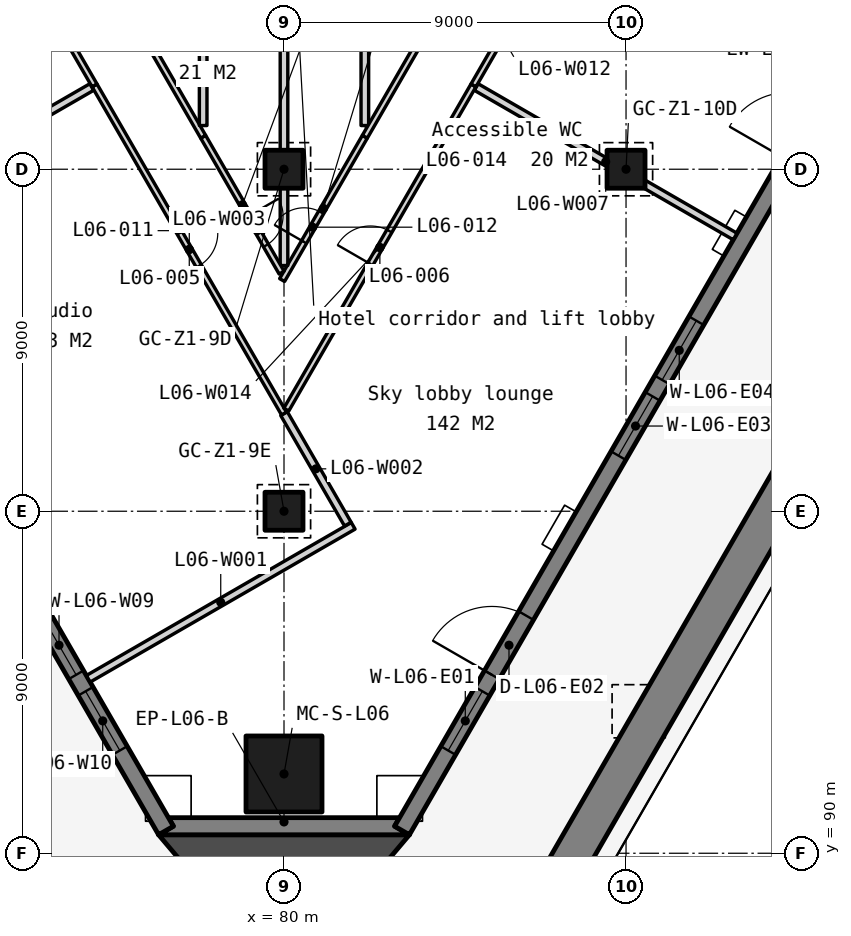
"""IFC4 building model, lengths in metres.
Left out: names, types, materials, properties, quantities, classifications, styles, units other than length and angle.
Written with IfcOpenShell. Run it as: python <this file> out.ifc"""

import sys

from ifc_helpers import new_model, si_unit, direction, frame, frame_2d, origin, origin_2d, place, context, subcontext, project, spatial, polyline, rectangle, outline, extrude, element, fill, save


model = new_model("IFC4")
c1 = context("Model", 3, precision=1e-05, world=origin(), true_north=direction((0.0, 1.0)))
c2 = subcontext(c1, "Body", "Model", "MODEL_VIEW")
j1 = project(units=[si_unit("LENGTHUNIT", "METRE"), si_unit("PLANEANGLEUNIT", "RADIAN")], contexts=[c1])
p1 = place(None, origin())
s1 = spatial("IfcSite", under=j1, at=p1, CompositionType="ELEMENT")
p2 = place(p1, origin())
s2 = spatial("IfcBuilding", under=s1, at=p2, CompositionType="ELEMENT")
p3 = place(p2, frame((0.0, 0.0, 35.0)))
s3 = spatial("IfcBuildingStorey", under=s2, at=p3, CompositionType="ELEMENT", Elevation=35.0)
for number, where, z_axis, x_axis in (
    (1, (80.0, 99.0, 0.0), (0.0, 0.0, 1.0), (1.0, 0.0, 0.0)),
    (2, (80.0, 108.0, 0.0), (0.0, 0.0, 1.0), (1.0, 0.0, 0.0)),
    (3, (89.0, 108.0, 0.0), (0.0, 0.0, 1.0), (1.0, 0.0, 0.0)),
):
    element("IfcColumn", number, at=place(p3, frame(where, z_axis=z_axis, x_axis=x_axis)), inside=s3, PredefinedType="COLUMN", context=c2, shape_type="SweptSolid", body=[
        extrude(rectangle(XDim=1.0, YDim=1.0, at=origin_2d()), origin(), (0.0, 0.0, 1.0), 3.5),
    ])
p4 = place(p3, frame((80.0, 92.086, 0.0), z_axis=(0.0, 0.0, 1.0), x_axis=(1.0, 0.0, 0.0)))
e4 = element("IfcColumn", 4, at=p4, inside=s3, PredefinedType="COLUMN", context=c2, shape_type="SweptSolid", body=[
    extrude(rectangle(XDim=2.0, YDim=2.0, at=origin_2d()), origin(), (0.0, 0.0, 1.0), 3.5),
])
p5 = place(p3, frame((0.0, 0.0, -0.2)))
e5 = element("IfcWall", 5, at=p5, inside=s3, PredefinedType="SOLIDWALL", context=c2, shape_type="SweptSolid", body=[
    extrude(outline(polyline([(76.7, 90.486), (77.09, 90.711), (76.96, 90.936), (83.04, 90.936), (82.91, 90.711), (83.3, 90.486), (76.7, 90.486)])), origin(), (0.0, 0.0, 1.0), 3.55),
])
p6 = place(p3, frame((54.495, 129.397, -0.2), z_axis=(0.0, 0.0, 1.0), x_axis=(0.499999201451, -0.866025864826, 0.0)))
e6 = element("IfcWall", 6, at=p6, inside=s3, PredefinedType="SOLIDWALL", context=c2, shape_type="SweptSolid", body=[
    extrude(outline(polyline([(44.8, 0.0), (44.8, 3.55), (0.0, 3.55), (0.0, 0.0), (44.8, 0.0)])), frame((0.0, 0.225, 0.0), z_axis=(0.0, -1.0, 0.0), x_axis=(1.0, 0.0, 0.0)), (0.0, 0.0, 1.0), 0.45),
])
p7 = place(p6, frame((2.43, 0.0, 1.1)))
e7 = element("IfcOpeningElement", 7, at=p7, cuts=e6, PredefinedType="OPENING", context=c2, shape_type="SweptSolid", body=[
    extrude(rectangle(XDim=1.8, YDim=1.5, at=frame_2d((0.9, 0.75))), frame((0.0, 0.235, 0.0), z_axis=(0.0, -1.0, 0.0), x_axis=(1.0, 0.0, 0.0)), (0.0, 0.0, 1.0), 0.47),
])
p8 = place(p6, frame((4.73, 0.0, 0.2)))
e8 = element("IfcOpeningElement", 8, at=p8, cuts=e6, PredefinedType="OPENING", context=c2, shape_type="SweptSolid", body=[
    extrude(rectangle(XDim=1.8, YDim=2.4, at=frame_2d((0.9, 1.2))), frame((0.0, 0.235, 0.0), z_axis=(0.0, -1.0, 0.0), x_axis=(1.0, 0.0, 0.0)), (0.0, 0.0, 1.0), 0.47),
])
p9 = place(p6, frame((11.39, 0.0, 1.1)))
e9 = element("IfcOpeningElement", 9, at=p9, cuts=e6, PredefinedType="OPENING", context=c2, shape_type="SweptSolid", body=[
    extrude(rectangle(XDim=1.8, YDim=1.5, at=frame_2d((0.9, 0.75))), frame((0.0, 0.235, 0.0), z_axis=(0.0, -1.0, 0.0), x_axis=(1.0, 0.0, 0.0)), (0.0, 0.0, 1.0), 0.47),
])
p10 = place(p6, frame((13.69, 0.0, 1.1)))
e10 = element("IfcOpeningElement", 10, at=p10, cuts=e6, PredefinedType="OPENING", context=c2, shape_type="SweptSolid", body=[
    extrude(rectangle(XDim=1.8, YDim=1.5, at=frame_2d((0.9, 0.75))), frame((0.0, 0.235, 0.0), z_axis=(0.0, -1.0, 0.0), x_axis=(1.0, 0.0, 0.0)), (0.0, 0.0, 1.0), 0.47),
])
p11 = place(p6, frame((20.35, 0.0, 0.2)))
e11 = element("IfcOpeningElement", 11, at=p11, cuts=e6, PredefinedType="OPENING", context=c2, shape_type="SweptSolid", body=[
    extrude(rectangle(XDim=1.8, YDim=2.4, at=frame_2d((0.9, 1.2))), frame((0.0, 0.235, 0.0), z_axis=(0.0, -1.0, 0.0), x_axis=(1.0, 0.0, 0.0)), (0.0, 0.0, 1.0), 0.47),
])
p12 = place(p6, frame((22.65, 0.0, 1.1)))
e12 = element("IfcOpeningElement", 12, at=p12, cuts=e6, PredefinedType="OPENING", context=c2, shape_type="SweptSolid", body=[
    extrude(rectangle(XDim=1.8, YDim=1.5, at=frame_2d((0.9, 0.75))), frame((0.0, 0.235, 0.0), z_axis=(0.0, -1.0, 0.0), x_axis=(1.0, 0.0, 0.0)), (0.0, 0.0, 1.0), 0.47),
])
p13 = place(p6, frame((29.31, 0.0, 1.1)))
e13 = element("IfcOpeningElement", 13, at=p13, cuts=e6, PredefinedType="OPENING", context=c2, shape_type="SweptSolid", body=[
    extrude(rectangle(XDim=1.8, YDim=1.5, at=frame_2d((0.9, 0.75))), frame((0.0, 0.235, 0.0), z_axis=(0.0, -1.0, 0.0), x_axis=(1.0, 0.0, 0.0)), (0.0, 0.0, 1.0), 0.47),
])
p14 = place(p6, frame((31.61, 0.0, 0.2)))
e14 = element("IfcOpeningElement", 14, at=p14, cuts=e6, PredefinedType="OPENING", context=c2, shape_type="SweptSolid", body=[
    extrude(rectangle(XDim=1.8, YDim=2.4, at=frame_2d((0.9, 1.2))), frame((0.0, 0.235, 0.0), z_axis=(0.0, -1.0, 0.0), x_axis=(1.0, 0.0, 0.0)), (0.0, 0.0, 1.0), 0.47),
])
p15 = place(p6, frame((38.27, 0.0, 1.1)))
e15 = element("IfcOpeningElement", 15, at=p15, cuts=e6, PredefinedType="OPENING", context=c2, shape_type="SweptSolid", body=[
    extrude(rectangle(XDim=1.8, YDim=1.5, at=frame_2d((0.9, 0.75))), frame((0.0, 0.235, 0.0), z_axis=(0.0, -1.0, 0.0), x_axis=(1.0, 0.0, 0.0)), (0.0, 0.0, 1.0), 0.47),
])
p16 = place(p6, frame((40.57, 0.0, 1.1)))
e16 = element("IfcOpeningElement", 16, at=p16, cuts=e6, PredefinedType="OPENING", context=c2, shape_type="SweptSolid", body=[
    extrude(rectangle(XDim=1.8, YDim=1.5, at=frame_2d((0.9, 0.75))), frame((0.0, 0.235, 0.0), z_axis=(0.0, -1.0, 0.0), x_axis=(1.0, 0.0, 0.0)), (0.0, 0.0, 1.0), 0.47),
])
p17 = place(p3, frame((83.105, 90.599, -0.2), z_axis=(0.0, 0.0, 1.0), x_axis=(0.499999201451, 0.866025864826, 0.0)))
e17 = element("IfcWall", 17, at=p17, inside=s3, PredefinedType="SOLIDWALL", context=c2, shape_type="SweptSolid", body=[
    extrude(outline(polyline([(44.8, 0.0), (44.8, 3.55), (0.0, 3.55), (0.0, 0.0), (44.8, 0.0)])), frame((0.0, 0.225, 0.0), z_axis=(0.0, -1.0, 0.0), x_axis=(1.0, 0.0, 0.0)), (0.0, 0.0, 1.0), 0.45),
])
p18 = place(p17, frame((2.43, 0.0, 1.1)))
e18 = element("IfcOpeningElement", 18, at=p18, cuts=e17, PredefinedType="OPENING", context=c2, shape_type="SweptSolid", body=[
    extrude(rectangle(XDim=1.8, YDim=1.5, at=frame_2d((0.9, 0.75))), frame((0.0, 0.235, 0.0), z_axis=(0.0, -1.0, 0.0), x_axis=(1.0, 0.0, 0.0)), (0.0, 0.0, 1.0), 0.47),
])
p19 = place(p17, frame((4.73, 0.0, 0.2)))
e19 = element("IfcOpeningElement", 19, at=p19, cuts=e17, PredefinedType="OPENING", context=c2, shape_type="SweptSolid", body=[
    extrude(rectangle(XDim=1.8, YDim=2.4, at=frame_2d((0.9, 1.2))), frame((0.0, 0.235, 0.0), z_axis=(0.0, -1.0, 0.0), x_axis=(1.0, 0.0, 0.0)), (0.0, 0.0, 1.0), 0.47),
])
p20 = place(p17, frame((11.39, 0.0, 1.1)))
e20 = element("IfcOpeningElement", 20, at=p20, cuts=e17, PredefinedType="OPENING", context=c2, shape_type="SweptSolid", body=[
    extrude(rectangle(XDim=1.8, YDim=1.5, at=frame_2d((0.9, 0.75))), frame((0.0, 0.235, 0.0), z_axis=(0.0, -1.0, 0.0), x_axis=(1.0, 0.0, 0.0)), (0.0, 0.0, 1.0), 0.47),
])
p21 = place(p17, frame((13.69, 0.0, 1.1)))
e21 = element("IfcOpeningElement", 21, at=p21, cuts=e17, PredefinedType="OPENING", context=c2, shape_type="SweptSolid", body=[
    extrude(rectangle(XDim=1.8, YDim=1.5, at=frame_2d((0.9, 0.75))), frame((0.0, 0.235, 0.0), z_axis=(0.0, -1.0, 0.0), x_axis=(1.0, 0.0, 0.0)), (0.0, 0.0, 1.0), 0.47),
])
p22 = place(p17, frame((20.35, 0.0, 0.2)))
e22 = element("IfcOpeningElement", 22, at=p22, cuts=e17, PredefinedType="OPENING", context=c2, shape_type="SweptSolid", body=[
    extrude(rectangle(XDim=1.8, YDim=2.4, at=frame_2d((0.9, 1.2))), frame((0.0, 0.235, 0.0), z_axis=(0.0, -1.0, 0.0), x_axis=(1.0, 0.0, 0.0)), (0.0, 0.0, 1.0), 0.47),
])
p23 = place(p17, frame((22.65, 0.0, 1.1)))
e23 = element("IfcOpeningElement", 23, at=p23, cuts=e17, PredefinedType="OPENING", context=c2, shape_type="SweptSolid", body=[
    extrude(rectangle(XDim=1.8, YDim=1.5, at=frame_2d((0.9, 0.75))), frame((0.0, 0.235, 0.0), z_axis=(0.0, -1.0, 0.0), x_axis=(1.0, 0.0, 0.0)), (0.0, 0.0, 1.0), 0.47),
])
p24 = place(p17, frame((29.31, 0.0, 1.1)))
e24 = element("IfcOpeningElement", 24, at=p24, cuts=e17, PredefinedType="OPENING", context=c2, shape_type="SweptSolid", body=[
    extrude(rectangle(XDim=1.8, YDim=1.5, at=frame_2d((0.9, 0.75))), frame((0.0, 0.235, 0.0), z_axis=(0.0, -1.0, 0.0), x_axis=(1.0, 0.0, 0.0)), (0.0, 0.0, 1.0), 0.47),
])
p25 = place(p17, frame((31.61, 0.0, 0.2)))
e25 = element("IfcOpeningElement", 25, at=p25, cuts=e17, PredefinedType="OPENING", context=c2, shape_type="SweptSolid", body=[
    extrude(rectangle(XDim=1.8, YDim=2.4, at=frame_2d((0.9, 1.2))), frame((0.0, 0.235, 0.0), z_axis=(0.0, -1.0, 0.0), x_axis=(1.0, 0.0, 0.0)), (0.0, 0.0, 1.0), 0.47),
])
p26 = place(p17, frame((38.27, 0.0, 1.1)))
e26 = element("IfcOpeningElement", 26, at=p26, cuts=e17, PredefinedType="OPENING", context=c2, shape_type="SweptSolid", body=[
    extrude(rectangle(XDim=1.8, YDim=1.5, at=frame_2d((0.9, 0.75))), frame((0.0, 0.235, 0.0), z_axis=(0.0, -1.0, 0.0), x_axis=(1.0, 0.0, 0.0)), (0.0, 0.0, 1.0), 0.47),
])
p27 = place(p17, frame((40.57, 0.0, 1.1)))
e27 = element("IfcOpeningElement", 27, at=p27, cuts=e17, PredefinedType="OPENING", context=c2, shape_type="SweptSolid", body=[
    extrude(rectangle(XDim=1.8, YDim=1.5, at=frame_2d((0.9, 0.75))), frame((0.0, 0.235, 0.0), z_axis=(0.0, -1.0, 0.0), x_axis=(1.0, 0.0, 0.0)), (0.0, 0.0, 1.0), 0.47),
])
for number, where, z_axis, x_axis in (
    (28, (110.208, 129.091, 0.0), (0.0, 0.0, 1.0), (-0.5, -0.866, 0.0)),
    (29, (77.166, 81.679, 0.0), (0.0, 0.0, 1.0), (-0.5, 0.866, 0.0)),
):
    element("IfcWall", number, at=place(p3, frame(where, z_axis=z_axis, x_axis=x_axis)), inside=s3, PredefinedType="STANDARD", context=c2, shape_type="SweptSolid", body=[
        extrude(rectangle(XDim=54.747, YDim=1.0, at=frame_2d((27.374, 0.0))), origin(), (0.0, 0.0, 1.0), 0.6),
    ])
p28 = place(p3, frame((0.0, 0.0, 0.04)))
e30 = element("IfcWall", 30, at=p28, inside=s3, PredefinedType="SOLIDWALL", context=c2, shape_type="SweptSolid", body=[
    extrude(outline(polyline([(76.7, 90.486), (80.0, 86.588), (83.3, 90.486), (76.7, 90.486)])), origin(), (0.0, 0.0, 1.0), 3.31),
])
p29 = place(p3, frame((74.85, 94.591, 0.0), z_axis=(0.0, 0.0, 1.0), x_axis=(0.866034066097, 0.499984996134, 0.0)))
e31 = element("IfcWall", 31, at=p29, inside=s3, PredefinedType="PARTITIONING", context=c2, shape_type="SweptSolid", body=[
    extrude(rectangle(XDim=8.05, YDim=0.2, at=frame_2d((4.025, 0.0))), origin(), (0.0, 0.0, 1.0), 3.35),
])
p30 = place(p3, frame((80.0, 101.571, 0.0), z_axis=(0.0, 0.0, 1.0), x_axis=(0.499875544254, -0.86609724642, 0.0)))
e32 = element("IfcWall", 32, at=p30, inside=s3, PredefinedType="PARTITIONING", context=c2, shape_type="SweptSolid", body=[
    extrude(rectangle(XDim=3.359, YDim=0.2, at=frame_2d((1.68, 0.0))), origin(), (0.0, 0.0, 1.0), 3.35),
])
p31 = place(p3, frame((75.015, 110.206, 0.0), z_axis=(0.0, 0.0, 1.0), x_axis=(0.49999446006, -0.866028602246, 0.0)))
e33 = element("IfcWall", 33, at=p31, inside=s3, PredefinedType="PARTITIONING", context=c2, shape_type="SweptSolid", body=[
    extrude(rectangle(XDim=9.971, YDim=0.15, at=frame_2d((4.985, 0.0))), origin(), (0.0, 0.0, 1.0), 3.35),
])
p32 = place(p31, frame((4.485, 0.0, 0.0)))
e34 = element("IfcOpeningElement", 34, at=p32, cuts=e33, PredefinedType="OPENING", context=c2, shape_type="SweptSolid", body=[
    extrude(rectangle(XDim=1.0, YDim=2.1, at=frame_2d((0.5, 1.05))), frame((0.0, 0.085, 0.0), z_axis=(0.0, -1.0, 0.0), x_axis=(1.0, 0.0, 0.0)), (0.0, 0.0, 1.0), 0.17),
])
p33 = place(p3, frame((79.95, 105.084, 0.0), z_axis=(0.0, 0.0, 1.0), x_axis=(0.500016925002, 0.866015631909, 0.0)))
e35 = element("IfcWall", 35, at=p33, inside=s3, PredefinedType="PARTITIONING", context=c2, shape_type="SweptSolid", body=[
    extrude(rectangle(XDim=4.354, YDim=0.15, at=frame_2d((2.177, 0.0))), origin(), (0.0, 0.0, 1.0), 3.35),
])
p34 = place(p33, frame((1.156, 0.0, 0.0)))
e36 = element("IfcOpeningElement", 36, at=p34, cuts=e35, PredefinedType="OPENING", context=c2, shape_type="SweptSolid", body=[
    extrude(rectangle(XDim=0.9, YDim=2.1, at=frame_2d((0.45, 1.05))), frame((0.0, 0.085, 0.0), z_axis=(0.0, -1.0, 0.0), x_axis=(1.0, 0.0, 0.0)), (0.0, 0.0, 1.0), 0.17),
])
p35 = place(p3, frame((80.0, 105.466, 0.0), z_axis=(0.0, 0.0, 1.0), x_axis=(0.0, 1.0, 0.0)))
e37 = element("IfcWall", 37, at=p35, inside=s3, PredefinedType="PARTITIONING", context=c2, shape_type="SweptSolid", body=[
    extrude(rectangle(XDim=12.209, YDim=0.2, at=frame_2d((6.105, 0.0))), origin(), (0.0, 0.0, 1.0), 2.801),
])
for number, where, z_axis, x_axis in (
    (38, (68.13, 106.23, 0.0), (0.0, 0.0, 1.0), (0.866, 0.5, 0.0)),
    (39, (85.059, 110.163, 0.0), (0.0, 0.0, 1.0), (0.866, -0.5, 0.0)),
):
    element("IfcWall", number, at=place(p3, frame(where, z_axis=z_axis, x_axis=x_axis)), inside=s3, PredefinedType="PARTITIONING", context=c2, shape_type="SweptSolid", body=[
        extrude(rectangle(XDim=7.865, YDim=0.2, at=frame_2d((3.933, 0.0))), origin(), (0.0, 0.0, 1.0), 3.35),
    ])
p36 = place(p3, frame((77.873, 108.854, 0.0), z_axis=(0.0, 0.0, 1.0), x_axis=(0.500005674609, -0.866022127522, 0.0)))
e40 = element("IfcWall", 40, at=p36, inside=s3, PredefinedType="PARTITIONING", context=c2, shape_type="SweptSolid", body=[
    extrude(rectangle(XDim=4.129, YDim=0.15, at=frame_2d((2.064, 0.0))), origin(), (0.0, 0.0, 1.0), 3.35),
])
p37 = place(p36, frame((2.403, 0.0, 0.0)))
e41 = element("IfcOpeningElement", 41, at=p37, cuts=e40, PredefinedType="OPENING", context=c2, shape_type="SweptSolid", body=[
    extrude(rectangle(XDim=0.9, YDim=2.1, at=frame_2d((0.45, 1.05))), frame((0.0, 0.085, 0.0), z_axis=(0.0, -1.0, 0.0), x_axis=(1.0, 0.0, 0.0)), (0.0, 0.0, 1.0), 0.17),
])
p38 = place(p3, frame((72.737, 117.75, 0.0), z_axis=(0.0, 0.0, 1.0), x_axis=(0.499994038704, -0.866028845513, 0.0)))
e42 = element("IfcWall", 42, at=p38, inside=s3, PredefinedType="PARTITIONING", context=c2, shape_type="SweptSolid", body=[
    extrude(rectangle(XDim=10.272, YDim=0.15, at=frame_2d((5.136, 0.0))), origin(), (0.0, 0.0, 1.0), 3.35),
])
p39 = place(p38, frame((4.686, 0.0, 0.0)))
e43 = element("IfcOpeningElement", 43, at=p39, cuts=e42, PredefinedType="OPENING", context=c2, shape_type="SweptSolid", body=[
    extrude(rectangle(XDim=0.9, YDim=2.1, at=frame_2d((0.45, 1.05))), frame((0.0, 0.085, 0.0), z_axis=(0.0, -1.0, 0.0), x_axis=(1.0, 0.0, 0.0)), (0.0, 0.0, 1.0), 0.17),
])
for number, where, z_axis, x_axis in (
    (44, (77.873, 109.15, 0.0), (0.0, 0.0, 1.0), (0.0, 1.0, 0.0)),
    (45, (82.127, 109.15, 0.0), (0.0, 0.0, 1.0), (0.0, 1.0, 0.0)),
):
    element("IfcWall", number, at=place(p3, frame(where, z_axis=z_axis, x_axis=x_axis)), inside=s3, PredefinedType="PARTITIONING", context=c2, shape_type="SweptSolid", body=[
        extrude(rectangle(XDim=8.525, YDim=0.2, at=frame_2d((4.263, 0.0))), origin(), (0.0, 0.0, 1.0), 3.35),
    ])
p40 = place(p3, frame((82.127, 108.854, 0.0), z_axis=(0.0, 0.0, 1.0), x_axis=(0.499994038704, 0.866028845513, 0.0)))
e46 = element("IfcWall", 46, at=p40, inside=s3, PredefinedType="PARTITIONING", context=c2, shape_type="SweptSolid", body=[
    extrude(rectangle(XDim=10.272, YDim=0.15, at=frame_2d((5.136, 0.0))), origin(), (0.0, 0.0, 1.0), 3.35),
])
p41 = place(p40, frame((4.686, 0.0, 0.0)))
e47 = element("IfcOpeningElement", 47, at=p41, cuts=e46, PredefinedType="OPENING", context=c2, shape_type="SweptSolid", body=[
    extrude(rectangle(XDim=0.9, YDim=2.1, at=frame_2d((0.45, 1.05))), frame((0.0, 0.085, 0.0), z_axis=(0.0, -1.0, 0.0), x_axis=(1.0, 0.0, 0.0)), (0.0, 0.0, 1.0), 0.17),
])
p42 = place(p3, frame((70.659, 117.75, 0.0), z_axis=(0.0, 0.0, 1.0), x_axis=(0.500015174863, -0.866016642396, 0.0)))
e48 = element("IfcWall", 48, at=p42, inside=s3, PredefinedType="PARTITIONING", context=c2, shape_type="SweptSolid", body=[
    extrude(rectangle(XDim=8.712, YDim=0.15, at=frame_2d((4.356, 0.0))), origin(), (0.0, 0.0, 1.0), 3.35),
])
p43 = place(p42, frame((3.856, 0.0, 0.0)))
e49 = element("IfcOpeningElement", 49, at=p43, cuts=e48, PredefinedType="OPENING", context=c2, shape_type="SweptSolid", body=[
    extrude(rectangle(XDim=1.0, YDim=2.1, at=frame_2d((0.5, 1.05))), frame((0.0, 0.085, 0.0), z_axis=(0.0, -1.0, 0.0), x_axis=(1.0, 0.0, 0.0)), (0.0, 0.0, 1.0), 0.17),
])
p44 = place(p3, frame((80.06, 101.675, 0.0), z_axis=(0.0, 0.0, 1.0), x_axis=(0.49999348569, 0.86602916479, 0.0)))
e50 = element("IfcWall", 50, at=p44, inside=s3, PredefinedType="PARTITIONING", context=c2, shape_type="SweptSolid", body=[
    extrude(rectangle(XDim=9.851, YDim=0.15, at=frame_2d((4.925, 0.0))), origin(), (0.0, 0.0, 1.0), 3.35),
])
p45 = place(p44, frame((4.425, 0.0, 0.0)))
e51 = element("IfcOpeningElement", 51, at=p45, cuts=e50, PredefinedType="OPENING", context=c2, shape_type="SweptSolid", body=[
    extrude(rectangle(XDim=1.0, YDim=2.1, at=frame_2d((0.5, 1.05))), frame((0.0, 0.085, 0.0), z_axis=(0.0, -1.0, 0.0), x_axis=(1.0, 0.0, 0.0)), (0.0, 0.0, 1.0), 0.17),
])
p46 = place(p3, frame((84.985, 110.206, 0.0), z_axis=(0.0, 0.0, 1.0), x_axis=(0.500015174863, 0.866016642396, 0.0)))
e52 = element("IfcWall", 52, at=p46, inside=s3, PredefinedType="PARTITIONING", context=c2, shape_type="SweptSolid", body=[
    extrude(rectangle(XDim=8.712, YDim=0.15, at=frame_2d((4.356, 0.0))), origin(), (0.0, 0.0, 1.0), 3.35),
])
p47 = place(p46, frame((3.856, 0.0, 0.0)))
e53 = element("IfcOpeningElement", 53, at=p47, cuts=e52, PredefinedType="OPENING", context=c2, shape_type="SweptSolid", body=[
    extrude(rectangle(XDim=1.0, YDim=2.1, at=frame_2d((0.5, 1.05))), frame((0.0, 0.085, 0.0), z_axis=(0.0, -1.0, 0.0), x_axis=(1.0, 0.0, 0.0)), (0.0, 0.0, 1.0), 0.17),
])
p48 = place(p15, origin())
e54 = element("IfcWindow", 54, at=p48, inside=s3, PartitioningType="SINGLE_PANEL", PredefinedType="WINDOW", context=c2, shape_type="SweptSolid", body=[
    extrude(rectangle(XDim=1.8, YDim=1.5, at=frame_2d((0.9, 0.75))), frame((0.0, 0.03, 0.0), z_axis=(0.0, -1.0, 0.0), x_axis=(1.0, 0.0, 0.0)), (0.0, 0.0, 1.0), 0.06),
])
fill(e15, e54)
p49 = place(p16, origin())
e55 = element("IfcWindow", 55, at=p49, inside=s3, PartitioningType="SINGLE_PANEL", PredefinedType="WINDOW", context=c2, shape_type="SweptSolid", body=[
    extrude(rectangle(XDim=1.8, YDim=1.5, at=frame_2d((0.9, 0.75))), frame((0.0, 0.03, 0.0), z_axis=(0.0, -1.0, 0.0), x_axis=(1.0, 0.0, 0.0)), (0.0, 0.0, 1.0), 0.06),
])
fill(e16, e55)
p50 = place(p18, origin())
e56 = element("IfcWindow", 56, at=p50, inside=s3, PartitioningType="SINGLE_PANEL", PredefinedType="WINDOW", context=c2, shape_type="SweptSolid", body=[
    extrude(rectangle(XDim=1.8, YDim=1.5, at=frame_2d((0.9, 0.75))), frame((0.0, 0.03, 0.0), z_axis=(0.0, -1.0, 0.0), x_axis=(1.0, 0.0, 0.0)), (0.0, 0.0, 1.0), 0.06),
])
fill(e18, e56)
p51 = place(p19, origin())
e57 = element("IfcDoor", 57, at=p51, inside=s3, OperationType="SINGLE_SWING_LEFT", PredefinedType="DOOR", context=c2, shape_type="SweptSolid", body=[
    extrude(rectangle(XDim=1.8, YDim=2.4, at=frame_2d((0.9, 1.2))), frame((0.0, 0.025, 0.0), z_axis=(0.0, -1.0, 0.0), x_axis=(1.0, 0.0, 0.0)), (0.0, 0.0, 1.0), 0.05),
])
fill(e19, e57)
p52 = place(p20, origin())
e58 = element("IfcWindow", 58, at=p52, inside=s3, PartitioningType="SINGLE_PANEL", PredefinedType="WINDOW", context=c2, shape_type="SweptSolid", body=[
    extrude(rectangle(XDim=1.8, YDim=1.5, at=frame_2d((0.9, 0.75))), frame((0.0, 0.03, 0.0), z_axis=(0.0, -1.0, 0.0), x_axis=(1.0, 0.0, 0.0)), (0.0, 0.0, 1.0), 0.06),
])
fill(e20, e58)
p53 = place(p21, origin())
e59 = element("IfcWindow", 59, at=p53, inside=s3, PartitioningType="SINGLE_PANEL", PredefinedType="WINDOW", context=c2, shape_type="SweptSolid", body=[
    extrude(rectangle(XDim=1.8, YDim=1.5, at=frame_2d((0.9, 0.75))), frame((0.0, 0.03, 0.0), z_axis=(0.0, -1.0, 0.0), x_axis=(1.0, 0.0, 0.0)), (0.0, 0.0, 1.0), 0.06),
])
fill(e21, e59)
p54 = place(p32, origin())
e60 = element("IfcDoor", 60, at=p54, inside=s3, OperationType="SINGLE_SWING_LEFT", PredefinedType="DOOR", context=c2, shape_type="SweptSolid", body=[
    extrude(rectangle(XDim=1.0, YDim=2.1, at=frame_2d((0.5, 1.05))), frame((0.0, 0.025, 0.0), z_axis=(0.0, -1.0, 0.0), x_axis=(1.0, 0.0, 0.0)), (0.0, 0.0, 1.0), 0.05),
])
fill(e34, e60)
p55 = place(p45, origin())
e61 = element("IfcDoor", 61, at=p55, inside=s3, OperationType="SINGLE_SWING_LEFT", PredefinedType="DOOR", context=c2, shape_type="SweptSolid", body=[
    extrude(rectangle(XDim=1.0, YDim=2.1, at=frame_2d((0.5, 1.05))), frame((0.0, 0.025, 0.0), z_axis=(0.0, -1.0, 0.0), x_axis=(1.0, 0.0, 0.0)), (0.0, 0.0, 1.0), 0.05),
])
fill(e51, e61)
p56 = place(p37, origin())
e62 = element("IfcDoor", 62, at=p56, inside=s3, OperationType="SINGLE_SWING_LEFT", PredefinedType="DOOR", context=c2, shape_type="SweptSolid", body=[
    extrude(rectangle(XDim=0.9, YDim=2.1, at=frame_2d((0.45, 1.05))), frame((0.0, 0.025, 0.0), z_axis=(0.0, -1.0, 0.0), x_axis=(1.0, 0.0, 0.0)), (0.0, 0.0, 1.0), 0.05),
])
fill(e41, e62)
p57 = place(p34, origin())
e63 = element("IfcDoor", 63, at=p57, inside=s3, OperationType="SINGLE_SWING_LEFT", PredefinedType="DOOR", context=c2, shape_type="SweptSolid", body=[
    extrude(rectangle(XDim=0.9, YDim=2.1, at=frame_2d((0.45, 1.05))), frame((0.0, 0.025, 0.0), z_axis=(0.0, -1.0, 0.0), x_axis=(1.0, 0.0, 0.0)), (0.0, 0.0, 1.0), 0.05),
])
fill(e36, e63)
save(model, sys.argv[1])
